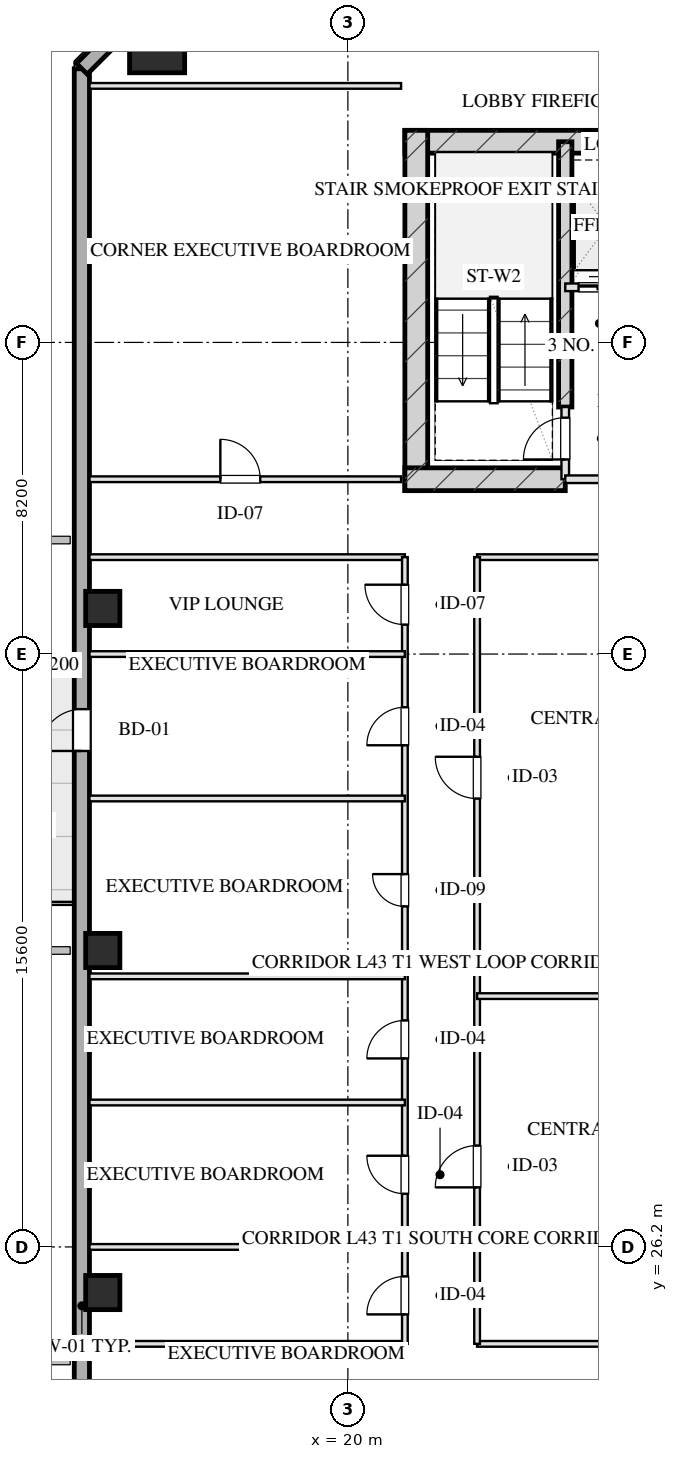
"""IFC4 building model, lengths in metres.
Left out: names, types, materials, properties, quantities, classifications, styles, units other than length and angle.
Written with IfcOpenShell. Run it as: python <this file> out.ifc"""

import sys

from ifc_helpers import new_model, si_unit, direction, frame, frame_2d, origin, origin_2d, place, context, subcontext, project, spatial, rectangle, hollow_rectangle, extrude, element, fill, save


model = new_model("IFC4")
c1 = context("Model", 3, precision=1e-05, world=origin(), true_north=direction((0.0, 1.0)))
c2 = subcontext(c1, "Body", "Model", "MODEL_VIEW")
j1 = project(units=[si_unit("LENGTHUNIT", "METRE"), si_unit("PLANEANGLEUNIT", "RADIAN")], contexts=[c1])
p1 = place(None, origin())
s1 = spatial("IfcSite", under=j1, at=p1, CompositionType="ELEMENT")
p2 = place(p1, origin())
s2 = spatial("IfcBuilding", under=s1, at=p2, CompositionType="ELEMENT")
p3 = place(p2, frame((0.0, 0.0, 163.3)))
s3 = spatial("IfcBuildingStorey", under=s2, at=p3, CompositionType="ELEMENT", Elevation=163.3)
p4 = place(p3, frame((21.5, 55.28, 0.0), z_axis=(0.0, 0.0, 1.0), x_axis=(1.0, 0.0, 0.0)))
e1 = element("IfcWall", 1, at=p4, inside=s3, PredefinedType="SHEAR", context=c2, shape_type="SweptSolid", body=[
    extrude(rectangle(XDim=17.0, YDim=0.6, at=frame_2d((8.5, 0.0))), origin(), (0.0, 0.0, 1.0), 3.45),
])
p5 = place(p3, frame((21.8, 46.1, 0.0), z_axis=(0.0, 0.0, 1.0), x_axis=(0.0, 1.0, 0.0)))
e2 = element("IfcWall", 2, at=p5, inside=s3, PredefinedType="SHEAR", context=c2, shape_type="SweptSolid", body=[
    extrude(rectangle(XDim=9.48, YDim=0.6, at=frame_2d((4.74, 0.0))), origin(), (0.0, 0.0, 1.0), 3.45),
])
p6 = place(p3, frame((25.72, 48.3, 0.0), z_axis=(0.0, 0.0, 1.0), x_axis=(0.0, 1.0, 0.0)))
e3 = element("IfcWall", 3, at=p6, inside=s3, PredefinedType="SHEAR", context=c2, shape_type="SweptSolid", body=[
    extrude(rectangle(XDim=6.98, YDim=0.35, at=frame_2d((3.49, 0.0))), origin(), (0.0, 0.0, 1.0), 3.45),
])
p7 = place(p3, frame((21.5, 46.4, 0.0), z_axis=(0.0, 0.0, 1.0), x_axis=(1.0, 0.0, 0.0)))
e4 = element("IfcWall", 4, at=p7, inside=s3, PredefinedType="SHEAR", context=c2, shape_type="SweptSolid", body=[
    extrude(rectangle(XDim=4.22, YDim=0.6, at=frame_2d((2.11, 0.0))), origin(), (0.0, 0.0, 1.0), 3.45),
])
p8 = place(p3, frame((14.98, 57.82, 0.0), z_axis=(0.0, 0.0, 1.0), x_axis=(1.0, 0.0, 0.0)))
e5 = element("IfcColumn", 5, at=p8, inside=s3, PredefinedType="COLUMN", context=c2, shape_type="SweptSolid", body=[
    extrude(hollow_rectangle(XDim=1.45, YDim=1.45, WallThickness=0.05, at=origin_2d()), origin(), (0.0, 0.0, 1.0), 3.451),
])
for number, where, z_axis, x_axis in (
    (6, (13.55, 25.0, 0.0), (0.0, 0.0, 1.0), (1.0, 0.0, 0.0)),
    (7, (13.55, 34.0, 0.0), (0.0, 0.0, 1.0), (1.0, 0.0, 0.0)),
    (8, (13.55, 43.0, 0.0), (0.0, 0.0, 1.0), (1.0, 0.0, 0.0)),
):
    element("IfcColumn", number, at=place(p3, frame(where, z_axis=z_axis, x_axis=x_axis)), inside=s3, PredefinedType="COLUMN", context=c2, shape_type="SweptSolid", body=[
        extrude(hollow_rectangle(XDim=0.9, YDim=0.9, WallThickness=0.032, at=origin_2d()), origin(), (0.0, 0.0, 1.0), 3.451),
    ])
p9 = place(p3, frame((13.0, 10.8, 0.0), z_axis=(0.0, 0.0, 1.0), x_axis=(0.0, 1.0, 0.0)))
e9 = element("IfcWall", 9, at=p9, inside=s3, PredefinedType="SOLIDWALL", context=c2, shape_type="SweptSolid", body=[
    extrude(rectangle(XDim=46.4, YDim=0.4, at=frame_2d((23.2, 0.0))), origin(), (0.0, 0.0, 1.0), 2.61),
])
p10 = place(p9, frame((28.45, 0.0, 0.0)))
e10 = element("IfcOpeningElement", 10, at=p10, cuts=e9, PredefinedType="OPENING", context=c2, shape_type="SweptSolid", body=[
    extrude(rectangle(XDim=1.1, YDim=2.15, at=frame_2d((0.55, 1.075))), frame((0.0, 0.21, 0.0), z_axis=(0.0, -1.0, 0.0), x_axis=(1.0, 0.0, 0.0)), (0.0, 0.0, 1.0), 0.42),
])
p11 = place(p3, frame((13.0, 57.2, 0.0), z_axis=(0.0, 0.0, 1.0), x_axis=(0.707106781187, 0.707106781187, 0.0)))
e11 = element("IfcWall", 11, at=p11, inside=s3, PredefinedType="SOLIDWALL", context=c2, shape_type="SweptSolid", body=[
    extrude(rectangle(XDim=3.677, YDim=0.4, at=frame_2d((1.838, 0.0))), origin(), (0.0, 0.0, 1.0), 2.61),
])
p12 = place(p3, frame((25.72, 46.4, 0.0), z_axis=(0.0, 0.0, 1.0), x_axis=(0.0, 1.0, 0.0)))
e12 = element("IfcWall", 12, at=p12, inside=s3, PredefinedType="PARTITIONING", context=c2, shape_type="SweptSolid", body=[
    extrude(rectangle(XDim=1.9, YDim=0.2, at=frame_2d((0.95, 0.0))), origin(), (0.0, 0.0, 1.0), 3.175),
])
p13 = place(p12, frame((0.52, 0.0, 0.0)))
e13 = element("IfcOpeningElement", 13, at=p13, cuts=e12, PredefinedType="OPENING", context=c2, shape_type="SweptSolid", body=[
    extrude(rectangle(XDim=1.1, YDim=2.05, at=frame_2d((0.55, 1.025))), frame((0.0, 0.11, 0.0), z_axis=(0.0, -1.0, 0.0), x_axis=(1.0, 0.0, 0.0)), (0.0, 0.0, 1.0), 0.22),
])
p14 = place(p3, frame((25.72, 46.4, 0.0), z_axis=(0.0, 0.0, 1.0), x_axis=(1.0, 0.0, 0.0)))
e14 = element("IfcWall", 14, at=p14, inside=s3, PredefinedType="PARTITIONING", context=c2, shape_type="SweptSolid", body=[
    extrude(rectangle(XDim=3.83, YDim=0.2, at=frame_2d((1.915, 0.0))), origin(), (0.0, 0.0, 1.0), 3.175),
])
p15 = place(p14, frame((1.35, 0.0, 0.0)))
e15 = element("IfcOpeningElement", 15, at=p15, cuts=e14, PredefinedType="OPENING", context=c2, shape_type="SweptSolid", body=[
    extrude(rectangle(XDim=1.2, YDim=2.05, at=frame_2d((0.6, 1.025))), frame((0.0, 0.11, 0.0), z_axis=(0.0, -1.0, 0.0), x_axis=(1.0, 0.0, 0.0)), (0.0, 0.0, 1.0), 0.22),
])
p16 = place(p3, frame((25.72, 51.45, 0.0), z_axis=(0.0, 0.0, 1.0), x_axis=(1.0, 0.0, 0.0)))
e16 = element("IfcWall", 16, at=p16, inside=s3, PredefinedType="PARTITIONING", context=c2, shape_type="SweptSolid", body=[
    extrude(rectangle(XDim=2.1, YDim=0.2, at=frame_2d((1.05, 0.0))), origin(), (0.0, 0.0, 1.0), 3.175),
])
p17 = place(p16, frame((0.35, 0.0, 0.0)))
e17 = element("IfcOpeningElement", 17, at=p17, cuts=e16, PredefinedType="OPENING", context=c2, shape_type="SweptSolid", body=[
    extrude(rectangle(XDim=1.1, YDim=2.05, at=frame_2d((0.55, 1.025))), frame((0.0, 0.11, 0.0), z_axis=(0.0, -1.0, 0.0), x_axis=(1.0, 0.0, 0.0)), (0.0, 0.0, 1.0), 0.22),
])
p18 = place(p3, frame((13.2, 56.75, 0.0), z_axis=(0.0, 0.0, 1.0), x_axis=(1.0, 0.0, 0.0)))
e18 = element("IfcWall", 18, at=p18, inside=s3, PredefinedType="PARTITIONING", context=c2, shape_type="SweptSolid", body=[
    extrude(rectangle(XDim=8.2, YDim=0.15, at=frame_2d((4.1, 0.0))), origin(), (0.0, 0.0, 1.0), 3.175),
])
p19 = place(p3, frame((13.2, 46.4, 0.0), z_axis=(0.0, 0.0, 1.0), x_axis=(1.0, 0.0, 0.0)))
e19 = element("IfcWall", 19, at=p19, inside=s3, PredefinedType="PARTITIONING", context=c2, shape_type="SweptSolid", body=[
    extrude(rectangle(XDim=8.2, YDim=0.15, at=frame_2d((4.1, 0.0))), origin(), (0.0, 0.0, 1.0), 3.175),
])
p20 = place(p19, frame((3.444, 0.0, 0.0)))
e20 = element("IfcOpeningElement", 20, at=p20, cuts=e19, PredefinedType="OPENING", context=c2, shape_type="SweptSolid", body=[
    extrude(rectangle(XDim=1.05, YDim=2.05, at=frame_2d((0.525, 1.025))), frame((0.0, 0.085, 0.0), z_axis=(0.0, -1.0, 0.0), x_axis=(1.0, 0.0, 0.0)), (0.0, 0.0, 1.0), 0.17),
])
p21 = place(p3, frame((13.2, 23.65, 0.0), z_axis=(0.0, 0.0, 1.0), x_axis=(1.0, 0.0, 0.0)))
e21 = element("IfcWall", 21, at=p21, inside=s3, PredefinedType="PARTITIONING", context=c2, shape_type="SweptSolid", body=[
    extrude(rectangle(XDim=8.3, YDim=0.15, at=frame_2d((4.15, 0.0))), origin(), (0.0, 0.0, 1.0), 3.175),
])
p22 = place(p3, frame((23.4, 23.65, 0.0), z_axis=(0.0, 0.0, 1.0), x_axis=(1.0, 0.0, 0.0)))
e22 = element("IfcWall", 22, at=p22, inside=s3, PredefinedType="PARTITIONING", context=c2, shape_type="SweptSolid", body=[
    extrude(rectangle(XDim=8.6, YDim=0.15, at=frame_2d((4.3, 0.0))), origin(), (0.0, 0.0, 1.0), 3.175),
])
p23 = place(p3, frame((13.2, 44.35, 0.0), z_axis=(0.0, 0.0, 1.0), x_axis=(1.0, 0.0, 0.0)))
e23 = element("IfcWall", 23, at=p23, inside=s3, PredefinedType="PARTITIONING", context=c2, shape_type="SweptSolid", body=[
    extrude(rectangle(XDim=8.3, YDim=0.15, at=frame_2d((4.15, 0.0))), origin(), (0.0, 0.0, 1.0), 3.175),
])
p24 = place(p3, frame((23.4, 44.35, 0.0), z_axis=(0.0, 0.0, 1.0), x_axis=(1.0, 0.0, 0.0)))
e24 = element("IfcWall", 24, at=p24, inside=s3, PredefinedType="PARTITIONING", context=c2, shape_type="SweptSolid", body=[
    extrude(rectangle(XDim=8.6, YDim=0.15, at=frame_2d((4.3, 0.0))), origin(), (0.0, 0.0, 1.0), 3.175),
])
p25 = place(p3, frame((21.5, 23.65, 0.0), z_axis=(0.0, 0.0, 1.0), x_axis=(0.0, 1.0, 0.0)))
e25 = element("IfcWall", 25, at=p25, inside=s3, PredefinedType="PARTITIONING", context=c2, shape_type="SweptSolid", body=[
    extrude(rectangle(XDim=20.7, YDim=0.15, at=frame_2d((10.35, 0.0))), origin(), (0.0, 0.0, 1.0), 3.175),
])
p26 = place(p25, frame((0.775, 0.0, 0.0)))
e26 = element("IfcOpeningElement", 26, at=p26, cuts=e25, PredefinedType="OPENING", context=c2, shape_type="SweptSolid", body=[
    extrude(rectangle(XDim=1.0, YDim=2.05, at=frame_2d((0.5, 1.025))), frame((0.0, 0.085, 0.0), z_axis=(0.0, -1.0, 0.0), x_axis=(1.0, 0.0, 0.0)), (0.0, 0.0, 1.0), 0.17),
])
p27 = place(p25, frame((3.95, 0.0, 0.0)))
e27 = element("IfcOpeningElement", 27, at=p27, cuts=e25, PredefinedType="OPENING", context=c2, shape_type="SweptSolid", body=[
    extrude(rectangle(XDim=1.0, YDim=2.05, at=frame_2d((0.5, 1.025))), frame((0.0, 0.085, 0.0), z_axis=(0.0, -1.0, 0.0), x_axis=(1.0, 0.0, 0.0)), (0.0, 0.0, 1.0), 0.17),
])
p28 = place(p25, frame((7.51, 0.0, 0.0)))
e28 = element("IfcOpeningElement", 28, at=p28, cuts=e25, PredefinedType="OPENING", context=c2, shape_type="SweptSolid", body=[
    extrude(rectangle(XDim=1.0, YDim=2.05, at=frame_2d((0.5, 1.025))), frame((0.0, 0.085, 0.0), z_axis=(0.0, -1.0, 0.0), x_axis=(1.0, 0.0, 0.0)), (0.0, 0.0, 1.0), 0.17),
])
p29 = place(p25, frame((11.51, 0.0, 0.0)))
e29 = element("IfcOpeningElement", 29, at=p29, cuts=e25, PredefinedType="OPENING", context=c2, shape_type="SweptSolid", body=[
    extrude(rectangle(XDim=0.85, YDim=2.05, at=frame_2d((0.425, 1.025))), frame((0.0, 0.085, 0.0), z_axis=(0.0, -1.0, 0.0), x_axis=(1.0, 0.0, 0.0)), (0.0, 0.0, 1.0), 0.17),
])
p30 = place(p25, frame((15.75, 0.0, 0.0)))
e30 = element("IfcOpeningElement", 30, at=p30, cuts=e25, PredefinedType="OPENING", context=c2, shape_type="SweptSolid", body=[
    extrude(rectangle(XDim=1.0, YDim=2.05, at=frame_2d((0.5, 1.025))), frame((0.0, 0.085, 0.0), z_axis=(0.0, -1.0, 0.0), x_axis=(1.0, 0.0, 0.0)), (0.0, 0.0, 1.0), 0.17),
])
p31 = place(p25, frame((18.925, 0.0, 0.0)))
e31 = element("IfcOpeningElement", 31, at=p31, cuts=e25, PredefinedType="OPENING", context=c2, shape_type="SweptSolid", body=[
    extrude(rectangle(XDim=1.05, YDim=2.05, at=frame_2d((0.525, 1.025))), frame((0.0, 0.085, 0.0), z_axis=(0.0, -1.0, 0.0), x_axis=(1.0, 0.0, 0.0)), (0.0, 0.0, 1.0), 0.17),
])
p32 = place(p3, frame((23.4, 23.65, 0.0), z_axis=(0.0, 0.0, 1.0), x_axis=(0.0, 1.0, 0.0)))
e32 = element("IfcWall", 32, at=p32, inside=s3, PredefinedType="PARTITIONING", context=c2, shape_type="SweptSolid", body=[
    extrude(rectangle(XDim=20.7, YDim=0.15, at=frame_2d((10.35, 0.0))), origin(), (0.0, 0.0, 1.0), 3.175),
])
p33 = place(p32, frame((4.117, 0.0, 0.0)))
e33 = element("IfcOpeningElement", 33, at=p33, cuts=e32, PredefinedType="OPENING", context=c2, shape_type="SweptSolid", body=[
    extrude(rectangle(XDim=1.1, YDim=2.05, at=frame_2d((0.55, 1.025))), frame((0.0, 0.085, 0.0), z_axis=(0.0, -1.0, 0.0), x_axis=(1.0, 0.0, 0.0)), (0.0, 0.0, 1.0), 0.17),
])
p34 = place(p32, frame((14.347, 0.0, 0.0)))
e34 = element("IfcOpeningElement", 34, at=p34, cuts=e32, PredefinedType="OPENING", context=c2, shape_type="SweptSolid", body=[
    extrude(rectangle(XDim=1.1, YDim=2.05, at=frame_2d((0.55, 1.025))), frame((0.0, 0.085, 0.0), z_axis=(0.0, -1.0, 0.0), x_axis=(1.0, 0.0, 0.0)), (0.0, 0.0, 1.0), 0.17),
])
p35 = place(p3, frame((23.4, 32.8, 0.0), z_axis=(0.0, 0.0, 1.0), x_axis=(1.0, 0.0, 0.0)))
e35 = element("IfcWall", 35, at=p35, inside=s3, PredefinedType="PARTITIONING", context=c2, shape_type="SweptSolid", body=[
    extrude(rectangle(XDim=8.6, YDim=0.15, at=frame_2d((4.3, 0.0))), origin(), (0.0, 0.0, 1.0), 3.175),
])
for number, where, z_axis, x_axis in (
    (36, (13.2, 26.2, 0.0), (0.0, 0.0, 1.0), (1.0, 0.0, 0.0)),
    (37, (13.2, 30.0, 0.0), (0.0, 0.0, 1.0), (1.0, 0.0, 0.0)),
    (38, (13.2, 33.32, 0.0), (0.0, 0.0, 1.0), (1.0, 0.0, 0.0)),
    (39, (13.2, 38.0, 0.0), (0.0, 0.0, 1.0), (1.0, 0.0, 0.0)),
    (40, (13.2, 41.8, 0.0), (0.0, 0.0, 1.0), (1.0, 0.0, 0.0)),
):
    element("IfcWall", number, at=place(p3, frame(where, z_axis=z_axis, x_axis=x_axis)), inside=s3, PredefinedType="PARTITIONING", context=c2, shape_type="SweptSolid", body=[
        extrude(rectangle(XDim=8.3, YDim=0.15, at=frame_2d((4.15, 0.0))), origin(), (0.0, 0.0, 1.0), 3.175),
    ])
p36 = place(p10, origin())
e41 = element("IfcDoor", 41, at=p36, inside=s3, OperationType="SINGLE_SWING_LEFT", PredefinedType="DOOR", context=c2, shape_type="SweptSolid", body=[
    extrude(rectangle(XDim=1.1, YDim=2.15, at=frame_2d((0.55, 1.075))), frame((0.0, 0.025, 0.0), z_axis=(0.0, -1.0, 0.0), x_axis=(1.0, 0.0, 0.0)), (0.0, 0.0, 1.0), 0.05),
])
fill(e10, e41)
p37 = place(p13, origin())
e42 = element("IfcDoor", 42, at=p37, inside=s3, OperationType="SINGLE_SWING_LEFT", PredefinedType="DOOR", context=c2, shape_type="SweptSolid", body=[
    extrude(rectangle(XDim=1.1, YDim=2.05, at=frame_2d((0.55, 1.025))), frame((0.0, 0.025, 0.0), z_axis=(0.0, -1.0, 0.0), x_axis=(1.0, 0.0, 0.0)), (0.0, 0.0, 1.0), 0.05),
])
fill(e13, e42)
p38 = place(p17, origin())
e43 = element("IfcDoor", 43, at=p38, inside=s3, OperationType="DOUBLE_DOOR_SLIDING", PredefinedType="DOOR", context=c2, shape_type="SweptSolid", body=[
    extrude(rectangle(XDim=1.1, YDim=2.05, at=frame_2d((0.55, 1.025))), frame((0.0, 0.025, 0.0), z_axis=(0.0, -1.0, 0.0), x_axis=(1.0, 0.0, 0.0)), (0.0, 0.0, 1.0), 0.05),
])
fill(e17, e43)
p39 = place(p20, origin())
e44 = element("IfcDoor", 44, at=p39, inside=s3, OperationType="SINGLE_SWING_LEFT", PredefinedType="DOOR", context=c2, shape_type="SweptSolid", body=[
    extrude(rectangle(XDim=1.05, YDim=2.05, at=frame_2d((0.525, 1.025))), frame((0.0, 0.025, 0.0), z_axis=(0.0, -1.0, 0.0), x_axis=(1.0, 0.0, 0.0)), (0.0, 0.0, 1.0), 0.05),
])
fill(e20, e44)
p40 = place(p26, origin())
e45 = element("IfcDoor", 45, at=p40, inside=s3, OperationType="SINGLE_SWING_LEFT", PredefinedType="DOOR", context=c2, shape_type="SweptSolid", body=[
    extrude(rectangle(XDim=1.0, YDim=2.05, at=frame_2d((0.5, 1.025))), frame((0.0, 0.025, 0.0), z_axis=(0.0, -1.0, 0.0), x_axis=(1.0, 0.0, 0.0)), (0.0, 0.0, 1.0), 0.05),
])
fill(e26, e45)
p41 = place(p27, origin())
e46 = element("IfcDoor", 46, at=p41, inside=s3, OperationType="SINGLE_SWING_RIGHT", PredefinedType="DOOR", context=c2, shape_type="SweptSolid", body=[
    extrude(rectangle(XDim=1.0, YDim=2.05, at=frame_2d((0.5, 1.025))), frame((0.0, 0.025, 0.0), z_axis=(0.0, -1.0, 0.0), x_axis=(1.0, 0.0, 0.0)), (0.0, 0.0, 1.0), 0.05),
])
fill(e27, e46)
p42 = place(p28, origin())
e47 = element("IfcDoor", 47, at=p42, inside=s3, OperationType="SINGLE_SWING_LEFT", PredefinedType="DOOR", context=c2, shape_type="SweptSolid", body=[
    extrude(rectangle(XDim=1.0, YDim=2.05, at=frame_2d((0.5, 1.025))), frame((0.0, 0.025, 0.0), z_axis=(0.0, -1.0, 0.0), x_axis=(1.0, 0.0, 0.0)), (0.0, 0.0, 1.0), 0.05),
])
fill(e28, e47)
p43 = place(p29, origin())
e48 = element("IfcDoor", 48, at=p43, inside=s3, OperationType="SINGLE_SWING_RIGHT", PredefinedType="DOOR", context=c2, shape_type="SweptSolid", body=[
    extrude(rectangle(XDim=0.85, YDim=2.05, at=frame_2d((0.425, 1.025))), frame((0.0, 0.025, 0.0), z_axis=(0.0, -1.0, 0.0), x_axis=(1.0, 0.0, 0.0)), (0.0, 0.0, 1.0), 0.05),
])
fill(e29, e48)
p44 = place(p30, origin())
e49 = element("IfcDoor", 49, at=p44, inside=s3, OperationType="SINGLE_SWING_LEFT", PredefinedType="DOOR", context=c2, shape_type="SweptSolid", body=[
    extrude(rectangle(XDim=1.0, YDim=2.05, at=frame_2d((0.5, 1.025))), frame((0.0, 0.025, 0.0), z_axis=(0.0, -1.0, 0.0), x_axis=(1.0, 0.0, 0.0)), (0.0, 0.0, 1.0), 0.05),
])
fill(e30, e49)
p45 = place(p31, origin())
e50 = element("IfcDoor", 50, at=p45, inside=s3, OperationType="SINGLE_SWING_RIGHT", PredefinedType="DOOR", context=c2, shape_type="SweptSolid", body=[
    extrude(rectangle(XDim=1.05, YDim=2.05, at=frame_2d((0.525, 1.025))), frame((0.0, 0.025, 0.0), z_axis=(0.0, -1.0, 0.0), x_axis=(1.0, 0.0, 0.0)), (0.0, 0.0, 1.0), 0.05),
])
fill(e31, e50)
p46 = place(p33, origin())
e51 = element("IfcDoor", 51, at=p46, inside=s3, OperationType="SINGLE_SWING_LEFT", PredefinedType="DOOR", context=c2, shape_type="SweptSolid", body=[
    extrude(rectangle(XDim=1.1, YDim=2.05, at=frame_2d((0.55, 1.025))), frame((0.0, 0.025, 0.0), z_axis=(0.0, -1.0, 0.0), x_axis=(1.0, 0.0, 0.0)), (0.0, 0.0, 1.0), 0.05),
])
fill(e33, e51)
p47 = place(p34, origin())
e52 = element("IfcDoor", 52, at=p47, inside=s3, OperationType="SINGLE_SWING_RIGHT", PredefinedType="DOOR", context=c2, shape_type="SweptSolid", body=[
    extrude(rectangle(XDim=1.1, YDim=2.05, at=frame_2d((0.55, 1.025))), frame((0.0, 0.025, 0.0), z_axis=(0.0, -1.0, 0.0), x_axis=(1.0, 0.0, 0.0)), (0.0, 0.0, 1.0), 0.05),
])
fill(e34, e52)
save(model, sys.argv[1])
